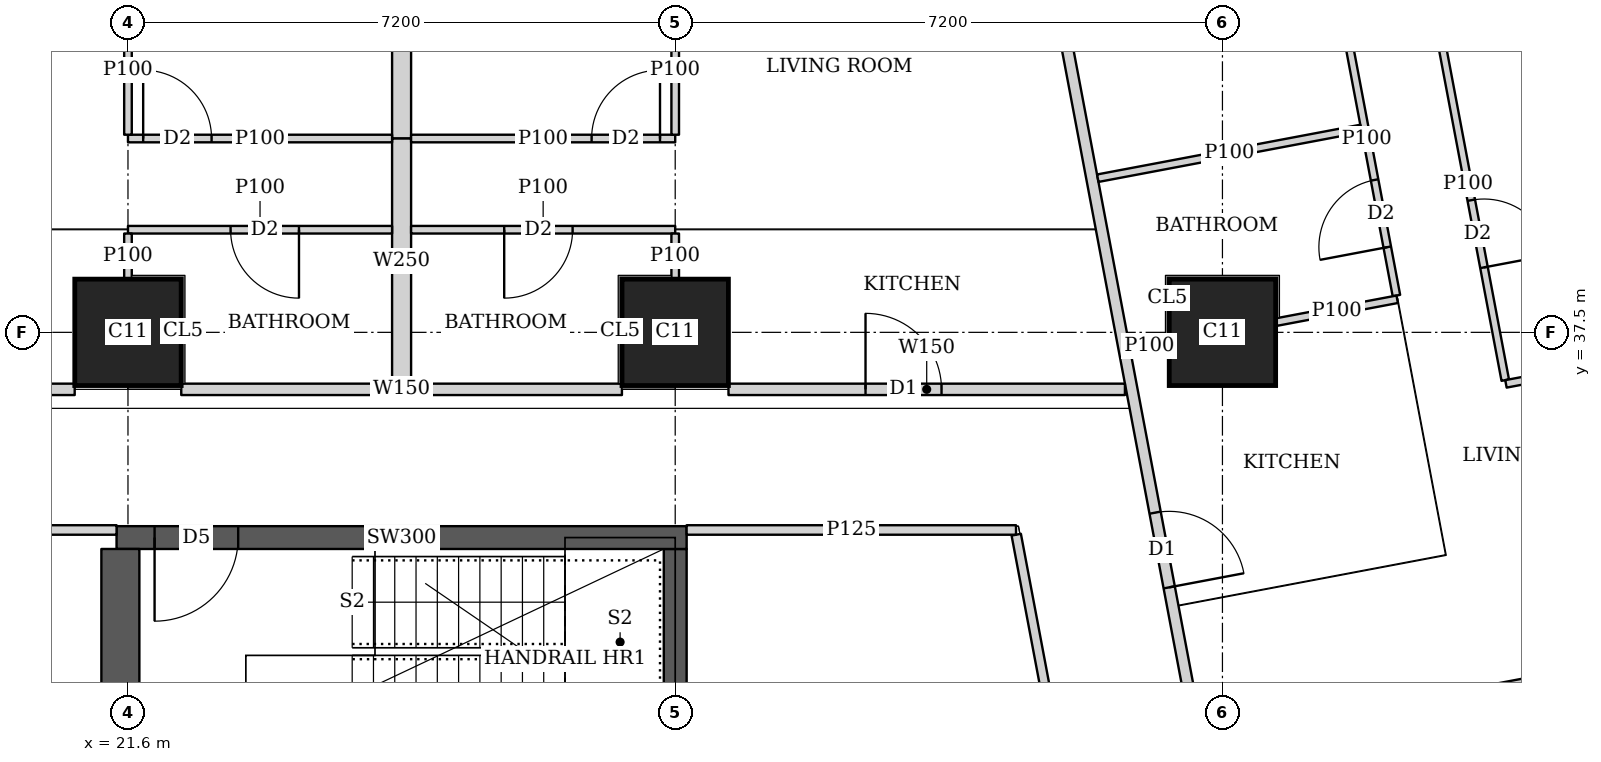
"""IFC4 building model, lengths in metres.
Left out: names, types, materials, properties, quantities, classifications, styles, units other than length and angle.
Written with IfcOpenShell. Run it as: python <this file> out.ifc"""

import sys

from ifc_helpers import new_model, si_unit, direction, frame, frame_2d, origin, origin_2d, place, context, subcontext, project, spatial, rectangle, extrude, element, fill, save


model = new_model("IFC4")
c1 = context("Model", 3, precision=1e-05, world=origin(), true_north=direction((0.0, 1.0)))
c2 = subcontext(c1, "Body", "Model", "MODEL_VIEW")
j1 = project(units=[si_unit("LENGTHUNIT", "METRE"), si_unit("PLANEANGLEUNIT", "RADIAN")], contexts=[c1])
p1 = place(None, origin())
s1 = spatial("IfcSite", under=j1, at=p1, CompositionType="ELEMENT")
p2 = place(p1, origin())
s2 = spatial("IfcBuilding", under=s1, at=p2, CompositionType="ELEMENT")
p3 = place(p2, frame((0.0, 0.0, 251.6)))
s3 = spatial("IfcBuildingStorey", under=s2, at=p3, CompositionType="ELEMENT", Elevation=251.6)
for number, where, z_axis, x_axis in (
    (1, (21.6, 37.5, 0.0), (0.0, 0.0, 1.0), (1.0, 0.0, 0.0)),
    (2, (28.8, 37.5, 0.0), (0.0, 0.0, 1.0), (1.0, 0.0, 0.0)),
    (3, (36.0, 37.5, 0.0), (0.0, 0.0, 1.0), (1.0, 0.0, 0.0)),
):
    element("IfcColumn", number, at=place(p3, frame(where, z_axis=z_axis, x_axis=x_axis)), inside=s3, PredefinedType="COLUMN", context=c2, shape_type="SweptSolid", body=[
        extrude(rectangle(XDim=1.4, YDim=1.4, at=origin_2d()), origin(), (0.0, 0.0, 1.0), 3.75),
    ])
p4 = place(p3, frame((21.45, 34.8, 0.0), z_axis=(0.0, 0.0, 1.0), x_axis=(1.0, 0.0, 0.0)))
e4 = element("IfcWall", 4, at=p4, inside=s3, PredefinedType="SHEAR", context=c2, shape_type="SweptSolid", body=[
    extrude(rectangle(XDim=7.5, YDim=0.3, at=frame_2d((3.75, 0.0))), origin(), (0.0, 0.0, 1.0), 3.75),
])
p5 = place(p4, frame((0.5, 0.0, 0.0)))
e5 = element("IfcOpeningElement", 5, at=p5, cuts=e4, PredefinedType="OPENING", context=c2, shape_type="SweptSolid", body=[
    extrude(rectangle(XDim=1.1, YDim=2.1, at=frame_2d((0.55, 1.05))), frame((0.0, 0.16, 0.0), z_axis=(0.0, -1.0, 0.0), x_axis=(1.0, 0.0, 0.0)), (0.0, 0.0, 1.0), 0.32),
])
p6 = place(p3, frame((21.5, 30.45, 0.0), z_axis=(0.0, 0.0, 1.0), x_axis=(0.0, 1.0, 0.0)))
e6 = element("IfcWall", 6, at=p6, inside=s3, PredefinedType="SHEAR", context=c2, shape_type="SweptSolid", body=[
    extrude(rectangle(XDim=4.2, YDim=0.5, at=frame_2d((2.1, 0.0))), origin(), (0.0, 0.0, 1.0), 3.75),
])
p7 = place(p3, frame((28.8, 30.45, 0.0), z_axis=(0.0, 0.0, 1.0), x_axis=(0.0, 1.0, 0.0)))
e7 = element("IfcWall", 7, at=p7, inside=s3, PredefinedType="SHEAR", context=c2, shape_type="SweptSolid", body=[
    extrude(rectangle(XDim=4.2, YDim=0.3, at=frame_2d((2.1, 0.0))), origin(), (0.0, 0.0, 1.0), 3.75),
])
p8 = place(p3, frame((16.001, 36.75, 0.0), z_axis=(0.0, 0.0, 1.0), x_axis=(1.0, 0.0, 0.0)))
e8 = element("IfcWall", 8, at=p8, inside=s3, PredefinedType="SOLIDWALL", context=c2, shape_type="SweptSolid", body=[
    extrude(rectangle(XDim=4.898, YDim=0.15, at=frame_2d((2.449, 0.0))), origin(), (0.0, 0.0, 1.0), 3.5),
])
p9 = place(p8, frame((1.074, 0.0, 0.0)))
e9 = element("IfcOpeningElement", 9, at=p9, cuts=e8, PredefinedType="OPENING", context=c2, shape_type="SweptSolid", body=[
    extrude(rectangle(XDim=1.0, YDim=2.1, at=frame_2d((0.5, 1.05))), frame((0.0, 0.085, 0.0), z_axis=(0.0, -1.0, 0.0), x_axis=(1.0, 0.0, 0.0)), (0.0, 0.0, 1.0), 0.17),
])
p10 = place(p3, frame((22.301, 36.75, 0.0), z_axis=(0.0, 0.0, 1.0), x_axis=(1.0, 0.0, 0.0)))
e10 = element("IfcWall", 10, at=p10, inside=s3, PredefinedType="SOLIDWALL", context=c2, shape_type="SweptSolid", body=[
    extrude(rectangle(XDim=5.798, YDim=0.15, at=frame_2d((2.899, 0.0))), origin(), (0.0, 0.0, 1.0), 3.5),
])
p11 = place(p3, frame((29.501, 36.75, 0.0), z_axis=(0.0, 0.0, 1.0), x_axis=(1.0, 0.0, 0.0)))
e11 = element("IfcWall", 11, at=p11, inside=s3, PredefinedType="SOLIDWALL", context=c2, shape_type="SweptSolid", body=[
    extrude(rectangle(XDim=5.216, YDim=0.15, at=frame_2d((2.608, 0.0))), origin(), (0.0, 0.0, 1.0), 3.5),
])
p12 = place(p11, frame((1.803, 0.0, 0.0)))
e12 = element("IfcOpeningElement", 12, at=p12, cuts=e11, PredefinedType="OPENING", context=c2, shape_type="SweptSolid", body=[
    extrude(rectangle(XDim=1.0, YDim=2.1, at=frame_2d((0.5, 1.05))), frame((0.0, 0.085, 0.0), z_axis=(0.0, -1.0, 0.0), x_axis=(1.0, 0.0, 0.0)), (0.0, 0.0, 1.0), 0.17),
])
p13 = place(p3, frame((33.781, 42.186, 0.0), z_axis=(0.0, 0.0, 1.0), x_axis=(0.185593518645, -0.9826266055, 0.0)))
e13 = element("IfcWall", 13, at=p13, inside=s3, PredefinedType="SOLIDWALL", context=c2, shape_type="SweptSolid", body=[
    extrude(rectangle(XDim=35.961, YDim=0.15, at=frame_2d((17.98, 0.0))), origin(), (0.0, 0.0, 1.0), 2.5),
])
p14 = place(p13, frame((7.183, 0.0, 0.0)))
e14 = element("IfcOpeningElement", 14, at=p14, cuts=e13, PredefinedType="OPENING", context=c2, shape_type="SweptSolid", body=[
    extrude(rectangle(XDim=1.0, YDim=2.1, at=frame_2d((0.5, 1.05))), frame((0.0, 0.085, 0.0), z_axis=(0.0, -1.0, 0.0), x_axis=(1.0, 0.0, 0.0)), (0.0, 0.0, 1.0), 0.17),
])
p15 = place(p13, frame((11.76, 0.0, 0.0)))
e15 = element("IfcOpeningElement", 15, at=p15, cuts=e13, PredefinedType="OPENING", context=c2, shape_type="SweptSolid", body=[
    extrude(rectangle(XDim=1.0, YDim=2.1, at=frame_2d((0.5, 1.05))), frame((0.0, 0.085, 0.0), z_axis=(0.0, -1.0, 0.0), x_axis=(1.0, 0.0, 0.0)), (0.0, 0.0, 1.0), 0.17),
])
p16 = place(p13, frame((23.863, 0.0, 0.0)))
e16 = element("IfcOpeningElement", 16, at=p16, cuts=e13, PredefinedType="OPENING", context=c2, shape_type="SweptSolid", body=[
    extrude(rectangle(XDim=1.0, YDim=2.1, at=frame_2d((0.5, 1.05))), frame((0.0, 0.085, 0.0), z_axis=(0.0, -1.0, 0.0), x_axis=(1.0, 0.0, 0.0)), (0.0, 0.0, 1.0), 0.17),
])
p17 = place(p13, frame((30.502, 0.0, 0.0)))
e17 = element("IfcOpeningElement", 17, at=p17, cuts=e13, PredefinedType="OPENING", context=c2, shape_type="SweptSolid", body=[
    extrude(rectangle(XDim=1.0, YDim=2.1, at=frame_2d((0.5, 1.05))), frame((0.0, 0.085, 0.0), z_axis=(0.0, -1.0, 0.0), x_axis=(1.0, 0.0, 0.0)), (0.0, 0.0, 1.0), 0.17),
])
p18 = place(p3, frame((38.744, 42.045, 0.0), z_axis=(0.0, 0.0, 1.0), x_axis=(0.185564988614, -0.982631993679, 0.0)))
e18 = element("IfcWall", 18, at=p18, inside=s3, PredefinedType="PARTITIONING", context=c2, shape_type="SweptSolid", body=[
    extrude(rectangle(XDim=5.265, YDim=0.1, at=frame_2d((2.633, 0.0))), origin(), (0.0, 0.0, 1.0), 3.5),
])
p19 = place(p18, frame((2.856, 0.0, 0.0)))
e19 = element("IfcOpeningElement", 19, at=p19, cuts=e18, PredefinedType="OPENING", context=c2, shape_type="SweptSolid", body=[
    extrude(rectangle(XDim=0.9, YDim=2.1, at=frame_2d((0.45, 1.05))), frame((0.0, 0.06, 0.0), z_axis=(0.0, -1.0, 0.0), x_axis=(1.0, 0.0, 0.0)), (0.0, 0.0, 1.0), 0.12),
])
p20 = place(p3, frame((37.51, 42.109, 0.0), z_axis=(0.0, 0.0, 1.0), x_axis=(0.185580569503, -0.98262905118, 0.0)))
e20 = element("IfcWall", 20, at=p20, inside=s3, PredefinedType="PARTITIONING", context=c2, shape_type="SweptSolid", body=[
    extrude(rectangle(XDim=4.198, YDim=0.1, at=frame_2d((2.099, 0.0))), origin(), (0.0, 0.0, 1.0), 3.5),
])
p21 = place(p20, frame((2.65, 0.0, 0.0)))
e21 = element("IfcOpeningElement", 21, at=p21, cuts=e20, PredefinedType="OPENING", context=c2, shape_type="SweptSolid", body=[
    extrude(rectangle(XDim=0.9, YDim=2.1, at=frame_2d((0.45, 1.05))), frame((0.0, 0.06, 0.0), z_axis=(0.0, -1.0, 0.0), x_axis=(1.0, 0.0, 0.0)), (0.0, 0.0, 1.0), 0.12),
])
p22 = place(p3, frame((41.054, 37.072, 0.0), z_axis=(0.0, 0.0, 1.0), x_axis=(-0.982635482721, -0.18554651195, 0.0)))
e22 = element("IfcWall", 22, at=p22, inside=s3, PredefinedType="PARTITIONING", context=c2, shape_type="SweptSolid", body=[
    extrude(rectangle(XDim=1.347, YDim=0.1, at=frame_2d((0.674, 0.0))), origin(), (0.0, 0.0, 1.0), 3.5),
])
p23 = place(p3, frame((37.823, 40.182, 0.0), z_axis=(0.0, 0.0, 1.0), x_axis=(-0.98263926043, -0.185526504472, 0.0)))
e23 = element("IfcWall", 23, at=p23, inside=s3, PredefinedType="PARTITIONING", context=c2, shape_type="SweptSolid", body=[
    extrude(rectangle(XDim=3.524, YDim=0.1, at=frame_2d((1.762, 0.0))), origin(), (0.0, 0.0, 1.0), 3.5),
])
p24 = place(p3, frame((38.299, 37.935, 0.0), z_axis=(0.0, 0.0, 1.0), x_axis=(-0.98263725405, -0.185537130931, 0.0)))
e24 = element("IfcWall", 24, at=p24, inside=s3, PredefinedType="PARTITIONING", context=c2, shape_type="SweptSolid", body=[
    extrude(rectangle(XDim=1.617, YDim=0.1, at=frame_2d((0.809, 0.0))), origin(), (0.0, 0.0, 1.0), 3.5),
])
p25 = place(p3, frame((35.29, 37.366, 0.0), z_axis=(0.0, 0.0, 1.0), x_axis=(-0.982715597703, -0.185121727606, 0.0)))
e25 = element("IfcWall", 25, at=p25, inside=s3, PredefinedType="PARTITIONING", context=c2, shape_type="SweptSolid", body=[
    extrude(rectangle(XDim=0.513, YDim=0.1, at=frame_2d((0.256, 0.0))), origin(), (0.0, 0.0, 1.0), 3.5),
])
p26 = place(p3, frame((40.468, 32.915, 0.0), z_axis=(0.0, 0.0, 1.0), x_axis=(-0.982635807605, -0.185544791394, 0.0)))
e26 = element("IfcWall", 26, at=p26, inside=s3, PredefinedType="SOLIDWALL", context=c2, shape_type="SweptSolid", body=[
    extrude(rectangle(XDim=4.775, YDim=0.25, at=frame_2d((2.388, 0.0))), origin(), (0.0, 0.0, 1.0), 3.5),
])
p27 = place(p3, frame((21.6, 40.05, 0.0), z_axis=(0.0, 0.0, 1.0), x_axis=(1.0, 0.0, 0.0)))
e27 = element("IfcWall", 27, at=p27, inside=s3, PredefinedType="PARTITIONING", context=c2, shape_type="SweptSolid", body=[
    extrude(rectangle(XDim=3.475, YDim=0.1, at=frame_2d((1.737, 0.0))), origin(), (0.0, 0.0, 1.0), 3.5),
])
p28 = place(p27, frame((0.2, 0.0, 0.0)))
e28 = element("IfcOpeningElement", 28, at=p28, cuts=e27, PredefinedType="OPENING", context=c2, shape_type="SweptSolid", body=[
    extrude(rectangle(XDim=0.9, YDim=2.1, at=frame_2d((0.45, 1.05))), frame((0.0, 0.06, 0.0), z_axis=(0.0, -1.0, 0.0), x_axis=(1.0, 0.0, 0.0)), (0.0, 0.0, 1.0), 0.12),
])
p29 = place(p3, frame((21.6, 38.85, 0.0), z_axis=(0.0, 0.0, 1.0), x_axis=(1.0, 0.0, 0.0)))
e29 = element("IfcWall", 29, at=p29, inside=s3, PredefinedType="PARTITIONING", context=c2, shape_type="SweptSolid", body=[
    extrude(rectangle(XDim=3.475, YDim=0.1, at=frame_2d((1.737, 0.0))), origin(), (0.0, 0.0, 1.0), 3.5),
])
p30 = place(p29, frame((1.35, 0.0, 0.0)))
e30 = element("IfcOpeningElement", 30, at=p30, cuts=e29, PredefinedType="OPENING", context=c2, shape_type="SweptSolid", body=[
    extrude(rectangle(XDim=0.9, YDim=2.1, at=frame_2d((0.45, 1.05))), frame((0.0, 0.06, 0.0), z_axis=(0.0, -1.0, 0.0), x_axis=(1.0, 0.0, 0.0)), (0.0, 0.0, 1.0), 0.12),
])
p31 = place(p3, frame((21.6, 40.1, 0.0), z_axis=(0.0, 0.0, 1.0), x_axis=(0.0, 1.0, 0.0)))
e31 = element("IfcWall", 31, at=p31, inside=s3, PredefinedType="PARTITIONING", context=c2, shape_type="SweptSolid", body=[
    extrude(rectangle(XDim=1.699, YDim=0.1, at=frame_2d((0.85, 0.0))), origin(), (0.0, 0.0, 1.0), 3.5),
])
p32 = place(p3, frame((21.6, 38.201, 0.0), z_axis=(0.0, 0.0, 1.0), x_axis=(0.0, 1.0, 0.0)))
e32 = element("IfcWall", 32, at=p32, inside=s3, PredefinedType="PARTITIONING", context=c2, shape_type="SweptSolid", body=[
    extrude(rectangle(XDim=0.599, YDim=0.1, at=frame_2d((0.3, 0.0))), origin(), (0.0, 0.0, 1.0), 3.5),
])
p33 = place(p3, frame((25.325, 40.05, 0.0), z_axis=(0.0, 0.0, 1.0), x_axis=(1.0, 0.0, 0.0)))
e33 = element("IfcWall", 33, at=p33, inside=s3, PredefinedType="PARTITIONING", context=c2, shape_type="SweptSolid", body=[
    extrude(rectangle(XDim=3.475, YDim=0.1, at=frame_2d((1.738, 0.0))), origin(), (0.0, 0.0, 1.0), 3.5),
])
p34 = place(p33, frame((2.375, 0.0, 0.0)))
e34 = element("IfcOpeningElement", 34, at=p34, cuts=e33, PredefinedType="OPENING", context=c2, shape_type="SweptSolid", body=[
    extrude(rectangle(XDim=0.9, YDim=2.1, at=frame_2d((0.45, 1.05))), frame((0.0, 0.06, 0.0), z_axis=(0.0, -1.0, 0.0), x_axis=(1.0, 0.0, 0.0)), (0.0, 0.0, 1.0), 0.12),
])
p35 = place(p3, frame((25.325, 38.85, 0.0), z_axis=(0.0, 0.0, 1.0), x_axis=(1.0, 0.0, 0.0)))
e35 = element("IfcWall", 35, at=p35, inside=s3, PredefinedType="PARTITIONING", context=c2, shape_type="SweptSolid", body=[
    extrude(rectangle(XDim=3.475, YDim=0.1, at=frame_2d((1.738, 0.0))), origin(), (0.0, 0.0, 1.0), 3.5),
])
p36 = place(p35, frame((1.225, 0.0, 0.0)))
e36 = element("IfcOpeningElement", 36, at=p36, cuts=e35, PredefinedType="OPENING", context=c2, shape_type="SweptSolid", body=[
    extrude(rectangle(XDim=0.9, YDim=2.1, at=frame_2d((0.45, 1.05))), frame((0.0, 0.06, 0.0), z_axis=(0.0, -1.0, 0.0), x_axis=(1.0, 0.0, 0.0)), (0.0, 0.0, 1.0), 0.12),
])
p37 = place(p3, frame((28.8, 40.1, 0.0), z_axis=(0.0, 0.0, 1.0), x_axis=(0.0, 1.0, 0.0)))
e37 = element("IfcWall", 37, at=p37, inside=s3, PredefinedType="PARTITIONING", context=c2, shape_type="SweptSolid", body=[
    extrude(rectangle(XDim=1.699, YDim=0.1, at=frame_2d((0.85, 0.0))), origin(), (0.0, 0.0, 1.0), 3.5),
])
p38 = place(p3, frame((28.8, 38.201, 0.0), z_axis=(0.0, 0.0, 1.0), x_axis=(0.0, 1.0, 0.0)))
e38 = element("IfcWall", 38, at=p38, inside=s3, PredefinedType="PARTITIONING", context=c2, shape_type="SweptSolid", body=[
    extrude(rectangle(XDim=0.599, YDim=0.1, at=frame_2d((0.3, 0.0))), origin(), (0.0, 0.0, 1.0), 3.5),
])
p39 = place(p3, frame((25.2, 40.05, 0.0), z_axis=(0.0, 0.0, 1.0), x_axis=(0.0, 1.0, 0.0)))
e39 = element("IfcWall", 39, at=p39, inside=s3, PredefinedType="SOLIDWALL", context=c2, shape_type="SweptSolid", body=[
    extrude(rectangle(XDim=3.8, YDim=0.25, at=frame_2d((1.9, 0.0))), origin(), (0.0, 0.0, 1.0), 2.05),
])
p40 = place(p3, frame((25.2, 36.825, 0.0), z_axis=(0.0, 0.0, 1.0), x_axis=(0.0, 1.0, 0.0)))
e40 = element("IfcWall", 40, at=p40, inside=s3, PredefinedType="SOLIDWALL", context=c2, shape_type="SweptSolid", body=[
    extrude(rectangle(XDim=3.225, YDim=0.25, at=frame_2d((1.613, 0.0))), origin(), (0.0, 0.0, 1.0), 3.5),
])
p41 = place(p3, frame((13.75, 34.9, 0.0), z_axis=(0.0, 0.0, 1.0), x_axis=(1.0, 0.0, 0.0)))
e41 = element("IfcWall", 41, at=p41, inside=s3, PredefinedType="PARTITIONING", context=c2, shape_type="SweptSolid", body=[
    extrude(rectangle(XDim=7.7, YDim=0.125, at=frame_2d((3.85, 0.0))), origin(), (0.0, 0.0, 1.0), 3.5),
])
p42 = place(p41, frame((4.15, 0.0, 0.0)))
e42 = element("IfcOpeningElement", 42, at=p42, cuts=e41, PredefinedType="OPENING", context=c2, shape_type="SweptSolid", body=[
    extrude(rectangle(XDim=1.8, YDim=2.1, at=frame_2d((0.9, 1.05))), frame((0.0, 0.073, 0.0), z_axis=(0.0, -1.0, 0.0), x_axis=(1.0, 0.0, 0.0)), (0.0, 0.0, 1.0), 0.145),
])
p43 = place(p3, frame((28.95, 34.9, 0.0), z_axis=(0.0, 0.0, 1.0), x_axis=(1.0, 0.0, 0.0)))
e43 = element("IfcWall", 43, at=p43, inside=s3, PredefinedType="PARTITIONING", context=c2, shape_type="SweptSolid", body=[
    extrude(rectangle(XDim=4.334, YDim=0.125, at=frame_2d((2.167, 0.0))), origin(), (0.0, 0.0, 1.0), 3.5),
])
p44 = place(p3, frame((34.193, 30.04, 0.0), z_axis=(0.0, 0.0, 1.0), x_axis=(-0.185556349615, 0.98263362507, 0.0)))
e44 = element("IfcWall", 44, at=p44, inside=s3, PredefinedType="PARTITIONING", context=c2, shape_type="SweptSolid", body=[
    extrude(rectangle(XDim=4.883, YDim=0.125, at=frame_2d((2.441, 0.0))), origin(), (0.0, 0.0, 1.0), 2.5),
])
p45 = place(p44, frame((0.95, 0.0, 0.0)))
e45 = element("IfcOpeningElement", 45, at=p45, cuts=e44, PredefinedType="OPENING", context=c2, shape_type="SweptSolid", body=[
    extrude(rectangle(XDim=1.0, YDim=2.1, at=frame_2d((0.5, 1.05))), frame((0.0, 0.073, 0.0), z_axis=(0.0, -1.0, 0.0), x_axis=(1.0, 0.0, 0.0)), (0.0, 0.0, 1.0), 0.145),
])
p46 = place(p19, origin())
e46 = element("IfcDoor", 46, at=p46, inside=s3, OperationType="SINGLE_SWING_RIGHT", PredefinedType="DOOR", context=c2, shape_type="SweptSolid", body=[
    extrude(rectangle(XDim=0.9, YDim=2.1, at=frame_2d((0.45, 1.05))), frame((0.0, 0.025, 0.0), z_axis=(0.0, -1.0, 0.0), x_axis=(1.0, 0.0, 0.0)), (0.0, 0.0, 1.0), 0.05),
])
fill(e19, e46)
p47 = place(p21, origin())
e47 = element("IfcDoor", 47, at=p47, inside=s3, OperationType="SINGLE_SWING_LEFT", PredefinedType="DOOR", context=c2, shape_type="SweptSolid", body=[
    extrude(rectangle(XDim=0.9, YDim=2.1, at=frame_2d((0.45, 1.05))), frame((0.0, 0.025, 0.0), z_axis=(0.0, -1.0, 0.0), x_axis=(1.0, 0.0, 0.0)), (0.0, 0.0, 1.0), 0.05),
])
fill(e21, e47)
p48 = place(p14, origin())
e48 = element("IfcDoor", 48, at=p48, inside=s3, OperationType="SINGLE_SWING_RIGHT", PredefinedType="DOOR", context=c2, shape_type="SweptSolid", body=[
    extrude(rectangle(XDim=1.0, YDim=2.1, at=frame_2d((0.5, 1.05))), frame((0.0, 0.025, 0.0), z_axis=(0.0, -1.0, 0.0), x_axis=(1.0, 0.0, 0.0)), (0.0, 0.0, 1.0), 0.05),
])
fill(e14, e48)
p49 = place(p28, origin())
e49 = element("IfcDoor", 49, at=p49, inside=s3, OperationType="SINGLE_SWING_LEFT", PredefinedType="DOOR", context=c2, shape_type="SweptSolid", body=[
    extrude(rectangle(XDim=0.9, YDim=2.1, at=frame_2d((0.45, 1.05))), frame((0.0, 0.025, 0.0), z_axis=(0.0, -1.0, 0.0), x_axis=(1.0, 0.0, 0.0)), (0.0, 0.0, 1.0), 0.05),
])
fill(e28, e49)
p50 = place(p30, origin())
e50 = element("IfcDoor", 50, at=p50, inside=s3, OperationType="SINGLE_SWING_LEFT", PredefinedType="DOOR", context=c2, shape_type="SweptSolid", body=[
    extrude(rectangle(XDim=0.9, YDim=2.1, at=frame_2d((0.45, 1.05))), frame((0.0, 0.025, 0.0), z_axis=(0.0, -1.0, 0.0), x_axis=(1.0, 0.0, 0.0)), (0.0, 0.0, 1.0), 0.05),
])
fill(e30, e50)
p51 = place(p34, origin())
e51 = element("IfcDoor", 51, at=p51, inside=s3, OperationType="SINGLE_SWING_RIGHT", PredefinedType="DOOR", context=c2, shape_type="SweptSolid", body=[
    extrude(rectangle(XDim=0.9, YDim=2.1, at=frame_2d((0.45, 1.05))), frame((0.0, 0.025, 0.0), z_axis=(0.0, -1.0, 0.0), x_axis=(1.0, 0.0, 0.0)), (0.0, 0.0, 1.0), 0.05),
])
fill(e34, e51)
p52 = place(p36, origin())
e52 = element("IfcDoor", 52, at=p52, inside=s3, OperationType="SINGLE_SWING_RIGHT", PredefinedType="DOOR", context=c2, shape_type="SweptSolid", body=[
    extrude(rectangle(XDim=0.9, YDim=2.1, at=frame_2d((0.45, 1.05))), frame((0.0, 0.025, 0.0), z_axis=(0.0, -1.0, 0.0), x_axis=(1.0, 0.0, 0.0)), (0.0, 0.0, 1.0), 0.05),
])
fill(e36, e52)
p53 = place(p12, origin())
e53 = element("IfcDoor", 53, at=p53, inside=s3, OperationType="SINGLE_SWING_LEFT", PredefinedType="DOOR", context=c2, shape_type="SweptSolid", body=[
    extrude(rectangle(XDim=1.0, YDim=2.1, at=frame_2d((0.5, 1.05))), frame((0.0, 0.025, 0.0), z_axis=(0.0, -1.0, 0.0), x_axis=(1.0, 0.0, 0.0)), (0.0, 0.0, 1.0), 0.05),
])
fill(e12, e53)
p54 = place(p5, origin())
e54 = element("IfcDoor", 54, at=p54, inside=s3, OperationType="SINGLE_SWING_RIGHT", PredefinedType="DOOR", context=c2, shape_type="SweptSolid", body=[
    extrude(rectangle(XDim=1.1, YDim=2.1, at=frame_2d((0.55, 1.05))), frame((0.0, 0.025, 0.0), z_axis=(0.0, -1.0, 0.0), x_axis=(1.0, 0.0, 0.0)), (0.0, 0.0, 1.0), 0.05),
])
fill(e5, e54)
save(model, sys.argv[1])
